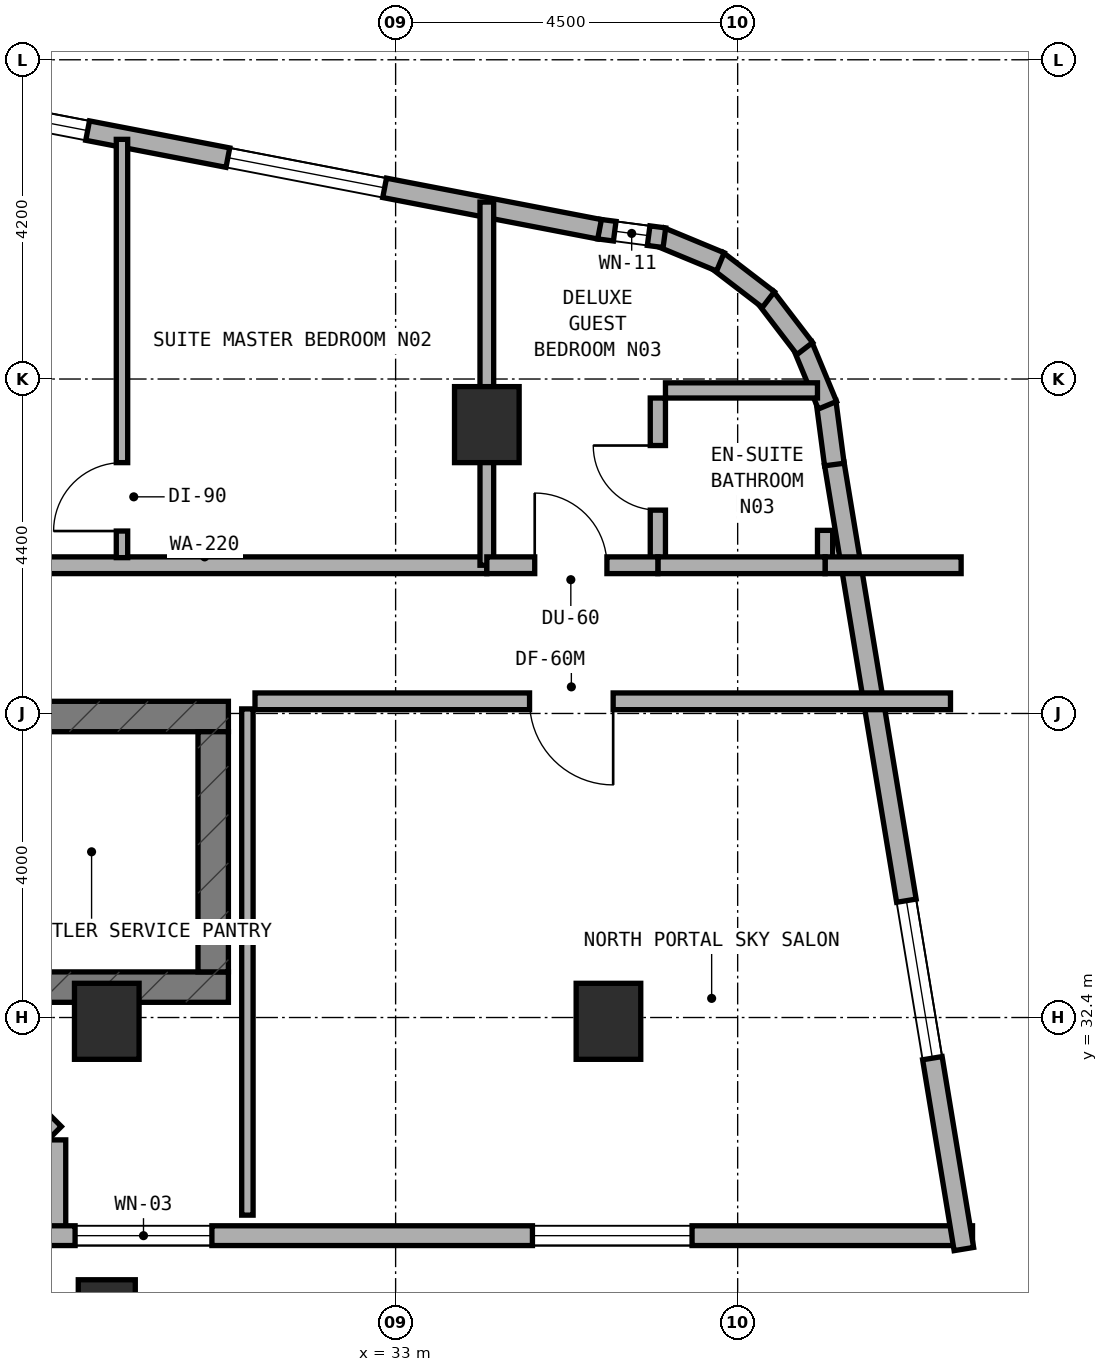
"""IFC4 building model, lengths in metres.
Left out: names, types, materials, properties, quantities, classifications, styles, units other than length and angle.
Written with IfcOpenShell. Run it as: python <this file> out.ifc"""

import sys

from ifc_helpers import new_model, si_unit, direction, frame, frame_2d, origin, origin_2d, place, context, subcontext, project, spatial, rectangle, extrude, element, fill, save


model = new_model("IFC4")
c1 = context("Model", 3, precision=1e-05, world=origin(), true_north=direction((0.0, 1.0)))
c2 = subcontext(c1, "Body", "Model", "MODEL_VIEW")
j1 = project(units=[si_unit("LENGTHUNIT", "METRE"), si_unit("PLANEANGLEUNIT", "RADIAN")], contexts=[c1])
p1 = place(None, origin())
s1 = spatial("IfcSite", under=j1, at=p1, CompositionType="ELEMENT")
p2 = place(p1, origin())
s2 = spatial("IfcBuilding", under=s1, at=p2, CompositionType="ELEMENT")
p3 = place(p2, frame((0.0, 0.0, 181.1)))
s3 = spatial("IfcBuildingStorey", under=s2, at=p3, CompositionType="ELEMENT", Elevation=181.1)
p4 = place(p3, frame((6.4, 32.8, 0.0), z_axis=(0.0, 0.0, 1.0), x_axis=(1.0, 0.0, 0.0)))
e1 = element("IfcWall", 1, at=p4, inside=s3, PredefinedType="SHEAR", context=c2, shape_type="SweptSolid", body=[
    extrude(rectangle(XDim=24.4, YDim=0.4, at=frame_2d((12.2, 0.0))), origin(), (0.0, 0.0, 1.0), 3.6),
])
p5 = place(p4, frame((6.05, 0.0, 0.0)))
e2 = element("IfcOpeningElement", 2, at=p5, cuts=e1, PredefinedType="OPENING", context=c2, shape_type="SweptSolid", body=[
    extrude(rectangle(XDim=1.1, YDim=2.15, at=frame_2d((0.55, 1.075))), frame((0.0, 0.21, 0.0), z_axis=(0.0, -1.0, 0.0), x_axis=(1.0, 0.0, 0.0)), (0.0, 0.0, 1.0), 0.42),
])
p6 = place(p3, frame((6.4, 36.36, 0.0), z_axis=(0.0, 0.0, 1.0), x_axis=(1.0, 0.0, 0.0)))
e3 = element("IfcWall", 3, at=p6, inside=s3, PredefinedType="SHEAR", context=c2, shape_type="SweptSolid", body=[
    extrude(rectangle(XDim=24.4, YDim=0.4, at=frame_2d((12.2, 0.0))), origin(), (0.0, 0.0, 1.0), 3.6),
])
p7 = place(p6, frame((9.15, 0.0, 0.0)))
e4 = element("IfcOpeningElement", 4, at=p7, cuts=e3, PredefinedType="OPENING", context=c2, shape_type="SweptSolid", body=[
    extrude(rectangle(XDim=1.2, YDim=2.15, at=frame_2d((0.6, 1.075))), frame((0.0, 0.21, 0.0), z_axis=(0.0, -1.0, 0.0), x_axis=(1.0, 0.0, 0.0)), (0.0, 0.0, 1.0), 0.42),
])
p8 = place(p6, frame((19.2, 0.0, 0.0)))
e5 = element("IfcOpeningElement", 5, at=p8, cuts=e3, PredefinedType="OPENING", context=c2, shape_type="SweptSolid", body=[
    extrude(rectangle(XDim=0.85, YDim=2.1, at=frame_2d((0.425, 1.05))), frame((0.0, 0.21, 0.0), z_axis=(0.0, -1.0, 0.0), x_axis=(1.0, 0.0, 0.0)), (0.0, 0.0, 1.0), 0.42),
])
p9 = place(p6, frame((17.22, 0.0, 0.0)))
e6 = element("IfcOpeningElement", 6, at=p9, cuts=e3, PredefinedType="OPENING", context=c2, shape_type="SweptSolid", body=[
    extrude(rectangle(XDim=0.85, YDim=2.1, at=frame_2d((0.425, 1.05))), frame((0.0, 0.21, 0.0), z_axis=(0.0, -1.0, 0.0), x_axis=(1.0, 0.0, 0.0)), (0.0, 0.0, 1.0), 0.42),
])
p10 = place(p3, frame((30.6, 33.0, 0.0), z_axis=(0.0, 0.0, 1.0), x_axis=(0.0, 1.0, 0.0)))
e7 = element("IfcWall", 7, at=p10, inside=s3, PredefinedType="SHEAR", context=c2, shape_type="SweptSolid", body=[
    extrude(rectangle(XDim=3.16, YDim=0.4, at=frame_2d((1.58, 0.0))), origin(), (0.0, 0.0, 1.0), 3.6),
])
for number, where, z_axis, x_axis in (
    (8, (34.2, 40.2, 0.0), (0.0, 0.0, 1.0), (1.0, 0.0, 0.0)),
    (9, (35.8, 32.35, 0.0), (0.0, 0.0, 1.0), (1.0, 0.0, 0.0)),
    (10, (29.2, 32.35, 0.0), (0.0, 0.0, 1.0), (1.0, 0.0, 0.0)),
):
    element("IfcColumn", number, at=place(p3, frame(where, z_axis=z_axis, x_axis=x_axis)), inside=s3, PredefinedType="COLUMN", context=c2, shape_type="SweptSolid", body=[
        extrude(rectangle(XDim=0.85, YDim=1.0, at=origin_2d()), origin(), (0.0, 0.0, 1.0), 3.6),
    ])
p11 = place(p3, frame((29.2, 28.5, 0.0), z_axis=(0.0, 0.0, 1.0), x_axis=(1.0, 0.0, 0.0)))
e11 = element("IfcColumn", 11, at=p11, inside=s3, PredefinedType="COLUMN", context=c2, shape_type="SweptSolid", body=[
    extrude(rectangle(XDim=0.75, YDim=0.9, at=origin_2d()), origin(), (0.0, 0.0, 1.0), 3.6),
])
p12 = place(p3, frame((26.722, 32.662, 0.0), z_axis=(0.0, 0.0, 1.0), x_axis=(0.707106781187, -0.707106781187, 0.0)))
e12 = element("IfcWall", 12, at=p12, inside=s3, PredefinedType="STANDARD", context=c2, shape_type="SweptSolid", body=[
    extrude(rectangle(XDim=2.529, YDim=0.26, at=frame_2d((1.264, 0.0))), origin(), (0.0, 0.0, 1.0), 3.32),
])
p13 = place(p12, frame((0.364, 0.0, 0.85)))
e13 = element("IfcOpeningElement", 13, at=p13, cuts=e12, PredefinedType="OPENING", context=c2, shape_type="SweptSolid", body=[
    extrude(rectangle(XDim=1.8, YDim=1.5, at=frame_2d((0.9, 0.75))), frame((0.0, 0.14, 0.0), z_axis=(0.0, -1.0, 0.0), x_axis=(1.0, 0.0, 0.0)), (0.0, 0.0, 1.0), 0.28),
])
p14 = place(p3, frame((28.53, 30.79, 0.0), z_axis=(0.0, 0.0, 1.0), x_axis=(0.0, -1.0, 0.0)))
e14 = element("IfcWall", 14, at=p14, inside=s3, PredefinedType="STANDARD", context=c2, shape_type="SweptSolid", body=[
    extrude(rectangle(XDim=1.38, YDim=0.26, at=frame_2d((0.69, 0.0))), origin(), (0.0, 0.0, 1.0), 3.32),
])
p15 = place(p3, frame((28.375, 29.53, 0.0), z_axis=(0.0, 0.0, 1.0), x_axis=(1.0, 0.0, 0.0)))
e15 = element("IfcWall", 15, at=p15, inside=s3, PredefinedType="STANDARD", context=c2, shape_type="SweptSolid", body=[
    extrude(rectangle(XDim=12.215, YDim=0.26, at=frame_2d((6.107, 0.0))), origin(), (0.0, 0.0, 1.0), 2.995),
])
p16 = place(p15, frame((0.408, 0.0, 0.85)))
e16 = element("IfcOpeningElement", 16, at=p16, cuts=e15, PredefinedType="OPENING", context=c2, shape_type="SweptSolid", body=[
    extrude(rectangle(XDim=1.8, YDim=1.5, at=frame_2d((0.9, 0.75))), frame((0.0, 0.14, 0.0), z_axis=(0.0, -1.0, 0.0), x_axis=(1.0, 0.0, 0.0)), (0.0, 0.0, 1.0), 0.28),
])
p17 = place(p15, frame((6.425, 0.0, 0.85)))
e17 = element("IfcOpeningElement", 17, at=p17, cuts=e15, PredefinedType="OPENING", context=c2, shape_type="SweptSolid", body=[
    extrude(rectangle(XDim=2.1, YDim=1.5, at=frame_2d((1.05, 0.75))), frame((0.0, 0.14, 0.0), z_axis=(0.0, -1.0, 0.0), x_axis=(1.0, 0.0, 0.0)), (0.0, 0.0, 1.0), 0.28),
])
p18 = place(p3, frame((40.476, 29.354, 0.0), z_axis=(0.0, 0.0, 1.0), x_axis=(-0.162811037825, 0.986657268742, 0.0)))
e18 = element("IfcWall", 18, at=p18, inside=s3, PredefinedType="STANDARD", context=c2, shape_type="SweptSolid", body=[
    extrude(rectangle(XDim=10.473, YDim=0.26, at=frame_2d((5.236, 0.0))), origin(), (0.0, 0.0, 1.0), 3.32),
])
p19 = place(p18, frame((2.545, 0.0, 0.85)))
e19 = element("IfcOpeningElement", 19, at=p19, cuts=e18, PredefinedType="OPENING", context=c2, shape_type="SweptSolid", body=[
    extrude(rectangle(XDim=2.1, YDim=1.5, at=frame_2d((1.05, 0.75))), frame((0.0, 0.14, 0.0), z_axis=(0.0, -1.0, 0.0), x_axis=(1.0, 0.0, 0.0)), (0.0, 0.0, 1.0), 0.28),
])
p20 = place(p3, frame((38.772, 39.675, 0.0), z_axis=(0.0, 0.0, 1.0), x_axis=(-0.130704676564, 0.99142134712, 0.0)))
e20 = element("IfcWall", 20, at=p20, inside=s3, PredefinedType="STANDARD", context=c2, shape_type="SweptSolid", body=[
    extrude(rectangle(XDim=0.833, YDim=0.26, at=frame_2d((0.417, 0.0))), origin(), (0.0, 0.0, 1.0), 3.32),
])
p21 = place(p3, frame((38.681, 40.455, 0.0), z_axis=(0.0, 0.0, 1.0), x_axis=(-0.383086687796, 0.923712395518, 0.0)))
e21 = element("IfcWall", 21, at=p21, inside=s3, PredefinedType="STANDARD", context=c2, shape_type="SweptSolid", body=[
    extrude(rectangle(XDim=0.851, YDim=0.26, at=frame_2d((0.425, 0.0))), origin(), (0.0, 0.0, 1.0), 3.32),
])
for number, where, z_axis, x_axis in (
    (22, (38.383, 41.201, 0.0), (0.0, 0.0, 1.0), (-0.608, 0.794, 0.0)),
    (23, (37.904, 41.845, 0.0), (0.0, 0.0, 1.0), (-0.794, 0.608, 0.0)),
):
    element("IfcWall", number, at=place(p3, frame(where, z_axis=z_axis, x_axis=x_axis)), inside=s3, PredefinedType="STANDARD", context=c2, shape_type="SweptSolid", body=[
        extrude(rectangle(XDim=0.85, YDim=0.26, at=frame_2d((0.425, 0.0))), origin(), (0.0, 0.0, 1.0), 3.32),
    ])
p22 = place(p3, frame((37.273, 42.341, 0.0), z_axis=(0.0, 0.0, 1.0), x_axis=(-0.923712395518, 0.383086687796, 0.0)))
e24 = element("IfcWall", 24, at=p22, inside=s3, PredefinedType="STANDARD", context=c2, shape_type="SweptSolid", body=[
    extrude(rectangle(XDim=0.851, YDim=0.26, at=frame_2d((0.425, 0.0))), origin(), (0.0, 0.0, 1.0), 3.32),
])
p23 = place(p3, frame((36.536, 42.659, 0.0), z_axis=(0.0, 0.0, 1.0), x_axis=(-0.991488716273, 0.130192647656, 0.0)))
e25 = element("IfcWall", 25, at=p23, inside=s3, PredefinedType="STANDARD", context=c2, shape_type="SweptSolid", body=[
    extrude(rectangle(XDim=0.868, YDim=0.26, at=frame_2d((0.434, 0.0))), origin(), (0.0, 0.0, 1.0), 3.32),
])
p24 = place(p23, frame((0.209, 0.0, 0.85)))
e26 = element("IfcOpeningElement", 26, at=p24, cuts=e25, PredefinedType="OPENING", context=c2, shape_type="SweptSolid", body=[
    extrude(rectangle(XDim=0.45, YDim=1.5, at=frame_2d((0.225, 0.75))), frame((0.0, 0.14, 0.0), z_axis=(0.0, -1.0, 0.0), x_axis=(1.0, 0.0, 0.0)), (0.0, 0.0, 1.0), 0.28),
])
p25 = place(p3, frame((35.683, 42.77, 0.0), z_axis=(0.0, 0.0, 1.0), x_axis=(-0.98192801022, 0.189254809039, 0.0)))
e27 = element("IfcWall", 27, at=p25, inside=s3, PredefinedType="STANDARD", context=c2, shape_type="SweptSolid", body=[
    extrude(rectangle(XDim=9.046, YDim=0.26, at=frame_2d((4.523, 0.0))), origin(), (0.0, 0.0, 1.0), 3.32),
])
p26 = place(p25, frame((2.88, 0.0, 0.85)))
e28 = element("IfcOpeningElement", 28, at=p26, cuts=e27, PredefinedType="OPENING", context=c2, shape_type="SweptSolid", body=[
    extrude(rectangle(XDim=2.1, YDim=1.5, at=frame_2d((1.05, 0.75))), frame((0.0, 0.14, 0.0), z_axis=(0.0, -1.0, 0.0), x_axis=(1.0, 0.0, 0.0)), (0.0, 0.0, 1.0), 0.28),
])
p27 = place(p25, frame((6.859, 0.0, 0.85)))
e29 = element("IfcOpeningElement", 29, at=p27, cuts=e27, PredefinedType="OPENING", context=c2, shape_type="SweptSolid", body=[
    extrude(rectangle(XDim=1.8, YDim=1.5, at=frame_2d((0.9, 0.75))), frame((0.0, 0.14, 0.0), z_axis=(0.0, -1.0, 0.0), x_axis=(1.0, 0.0, 0.0)), (0.0, 0.0, 1.0), 0.28),
])
p28 = place(p3, frame((18.4, 38.35, 0.0), z_axis=(0.0, 0.0, 1.0), x_axis=(1.0, 0.0, 0.0)))
e30 = element("IfcWall", 30, at=p28, inside=s3, PredefinedType="SOLIDWALL", context=c2, shape_type="SweptSolid", body=[
    extrude(rectangle(XDim=15.8, YDim=0.22, at=frame_2d((7.9, 0.0))), origin(), (0.0, 0.0, 1.0), 2.995),
])
p29 = place(p28, frame((7.425, 0.0, 0.0)))
e31 = element("IfcOpeningElement", 31, at=p29, cuts=e30, PredefinedType="OPENING", context=c2, shape_type="SweptSolid", body=[
    extrude(rectangle(XDim=0.95, YDim=2.1, at=frame_2d((0.475, 1.05))), frame((0.0, 0.12, 0.0), z_axis=(0.0, -1.0, 0.0), x_axis=(1.0, 0.0, 0.0)), (0.0, 0.0, 1.0), 0.24),
])
p30 = place(p3, frame((29.4, 38.45, 0.0), z_axis=(0.0, 0.0, 1.0), x_axis=(0.0, 1.0, 0.0)))
e32 = element("IfcWall", 32, at=p30, inside=s3, PredefinedType="PARTITIONING", context=c2, shape_type="SweptSolid", body=[
    extrude(rectangle(XDim=5.503, YDim=0.15, at=frame_2d((2.751, 0.0))), origin(), (0.0, 0.0, 1.0), 2.895),
])
p31 = place(p30, frame((0.35, 0.0, 0.0)))
e33 = element("IfcOpeningElement", 33, at=p31, cuts=e32, PredefinedType="OPENING", context=c2, shape_type="SweptSolid", body=[
    extrude(rectangle(XDim=0.9, YDim=2.1, at=frame_2d((0.45, 1.05))), frame((0.0, 0.085, 0.0), z_axis=(0.0, -1.0, 0.0), x_axis=(1.0, 0.0, 0.0)), (0.0, 0.0, 1.0), 0.17),
])
p32 = place(p3, frame((34.2, 38.35, 0.0), z_axis=(0.0, 0.0, 1.0), x_axis=(0.0, 1.0, 0.0)))
e34 = element("IfcWall", 34, at=p32, inside=s3, PredefinedType="SOLIDWALL", context=c2, shape_type="SweptSolid", body=[
    extrude(rectangle(XDim=4.778, YDim=0.18, at=frame_2d((2.389, 0.0))), origin(), (0.0, 0.0, 1.0), 2.935),
])
p33 = place(p3, frame((36.45, 38.45, 0.0), z_axis=(0.0, 0.0, 1.0), x_axis=(0.0, 1.0, 0.0)))
e35 = element("IfcWall", 35, at=p33, inside=s3, PredefinedType="PLUMBINGWALL", context=c2, shape_type="SweptSolid", body=[
    extrude(rectangle(XDim=2.1, YDim=0.2, at=frame_2d((1.05, 0.0))), origin(), (0.0, 0.0, 1.0), 3.32),
])
p34 = place(p33, frame((0.625, 0.0, 0.0)))
e36 = element("IfcOpeningElement", 36, at=p34, cuts=e35, PredefinedType="OPENING", context=c2, shape_type="SweptSolid", body=[
    extrude(rectangle(XDim=0.85, YDim=2.1, at=frame_2d((0.425, 1.05))), frame((0.0, 0.11, 0.0), z_axis=(0.0, -1.0, 0.0), x_axis=(1.0, 0.0, 0.0)), (0.0, 0.0, 1.0), 0.22),
])
p35 = place(p3, frame((36.55, 40.65, 0.0), z_axis=(0.0, 0.0, 1.0), x_axis=(1.0, 0.0, 0.0)))
e37 = element("IfcWall", 37, at=p35, inside=s3, PredefinedType="PLUMBINGWALL", context=c2, shape_type="SweptSolid", body=[
    extrude(rectangle(XDim=2.0, YDim=0.2, at=frame_2d((1.0, 0.0))), origin(), (0.0, 0.0, 1.0), 3.32),
])
p36 = place(p3, frame((38.65, 38.35, 0.0), z_axis=(0.0, 0.0, 1.0), x_axis=(0.0, 1.0, 0.0)))
e38 = element("IfcWall", 38, at=p36, inside=s3, PredefinedType="PLUMBINGWALL", context=c2, shape_type="SweptSolid", body=[
    extrude(rectangle(XDim=0.459, YDim=0.2, at=frame_2d((0.229, 0.0))), origin(), (0.0, 0.0, 1.0), 3.32),
])
p37 = place(p3, frame((38.65, 38.35, 0.0), z_axis=(0.0, 0.0, 1.0), x_axis=(1.0, 0.0, 0.0)))
e39 = element("IfcWall", 39, at=p37, inside=s3, PredefinedType="SOLIDWALL", context=c2, shape_type="SweptSolid", body=[
    extrude(rectangle(XDim=1.79, YDim=0.22, at=frame_2d((0.895, 0.0))), origin(), (0.0, 0.0, 1.0), 3.32),
])
p38 = place(p3, frame((36.45, 38.35, 0.0), z_axis=(0.0, 0.0, 1.0), x_axis=(1.0, 0.0, 0.0)))
e40 = element("IfcWall", 40, at=p38, inside=s3, PredefinedType="SOLIDWALL", context=c2, shape_type="SweptSolid", body=[
    extrude(rectangle(XDim=2.2, YDim=0.22, at=frame_2d((1.1, 0.0))), origin(), (0.0, 0.0, 1.0), 3.32),
])
p39 = place(p3, frame((34.2, 38.35, 0.0), z_axis=(0.0, 0.0, 1.0), x_axis=(1.0, 0.0, 0.0)))
e41 = element("IfcWall", 41, at=p39, inside=s3, PredefinedType="SOLIDWALL", context=c2, shape_type="SweptSolid", body=[
    extrude(rectangle(XDim=2.25, YDim=0.22, at=frame_2d((1.125, 0.0))), origin(), (0.0, 0.0, 1.0), 2.935),
])
p40 = place(p39, frame((0.63, 0.0, 0.0)))
e42 = element("IfcOpeningElement", 42, at=p40, cuts=e41, PredefinedType="OPENING", context=c2, shape_type="SweptSolid", body=[
    extrude(rectangle(XDim=0.95, YDim=2.1, at=frame_2d((0.475, 1.05))), frame((0.0, 0.12, 0.0), z_axis=(0.0, -1.0, 0.0), x_axis=(1.0, 0.0, 0.0)), (0.0, 0.0, 1.0), 0.24),
])
p41 = place(p3, frame((31.05, 29.8, 0.0), z_axis=(0.0, 0.0, 1.0), x_axis=(0.0, 1.0, 0.0)))
e43 = element("IfcWall", 43, at=p41, inside=s3, PredefinedType="PARTITIONING", context=c2, shape_type="SweptSolid", body=[
    extrude(rectangle(XDim=6.66, YDim=0.15, at=frame_2d((3.33, 0.0))), origin(), (0.0, 0.0, 1.0), 2.995),
])
p42 = place(p3, frame((31.15, 36.56, 0.0), z_axis=(0.0, 0.0, 1.0), x_axis=(1.0, 0.0, 0.0)))
e44 = element("IfcWall", 44, at=p42, inside=s3, PredefinedType="SOLIDWALL", context=c2, shape_type="SweptSolid", body=[
    extrude(rectangle(XDim=9.15, YDim=0.22, at=frame_2d((4.575, 0.0))), origin(), (0.0, 0.0, 1.0), 2.935),
])
p43 = place(p42, frame((3.612, 0.0, 0.0)))
e45 = element("IfcOpeningElement", 45, at=p43, cuts=e44, PredefinedType="OPENING", context=c2, shape_type="SweptSolid", body=[
    extrude(rectangle(XDim=1.1, YDim=2.1, at=frame_2d((0.55, 1.05))), frame((0.0, 0.12, 0.0), z_axis=(0.0, -1.0, 0.0), x_axis=(1.0, 0.0, 0.0)), (0.0, 0.0, 1.0), 0.24),
])
p44 = place(p16, origin())
e46 = element("IfcWindow", 46, at=p44, inside=s3, PartitioningType="SINGLE_PANEL", PredefinedType="WINDOW", context=c2, shape_type="SweptSolid", body=[
    extrude(rectangle(XDim=1.8, YDim=1.5, at=frame_2d((0.9, 0.75))), frame((0.0, 0.03, 0.0), z_axis=(0.0, -1.0, 0.0), x_axis=(1.0, 0.0, 0.0)), (0.0, 0.0, 1.0), 0.06),
])
fill(e16, e46)
p45 = place(p17, origin())
e47 = element("IfcWindow", 47, at=p45, inside=s3, PartitioningType="SINGLE_PANEL", PredefinedType="WINDOW", context=c2, shape_type="SweptSolid", body=[
    extrude(rectangle(XDim=2.1, YDim=1.5, at=frame_2d((1.05, 0.75))), frame((0.0, 0.03, 0.0), z_axis=(0.0, -1.0, 0.0), x_axis=(1.0, 0.0, 0.0)), (0.0, 0.0, 1.0), 0.06),
])
fill(e17, e47)
p46 = place(p19, origin())
e48 = element("IfcWindow", 48, at=p46, inside=s3, PartitioningType="SINGLE_PANEL", PredefinedType="WINDOW", context=c2, shape_type="SweptSolid", body=[
    extrude(rectangle(XDim=2.1, YDim=1.5, at=frame_2d((1.05, 0.75))), frame((0.0, 0.03, 0.0), z_axis=(0.0, -1.0, 0.0), x_axis=(1.0, 0.0, 0.0)), (0.0, 0.0, 1.0), 0.06),
])
fill(e19, e48)
p47 = place(p26, origin())
e49 = element("IfcWindow", 49, at=p47, inside=s3, PartitioningType="SINGLE_PANEL", PredefinedType="WINDOW", context=c2, shape_type="SweptSolid", body=[
    extrude(rectangle(XDim=2.1, YDim=1.5, at=frame_2d((1.05, 0.75))), frame((0.0, 0.03, 0.0), z_axis=(0.0, -1.0, 0.0), x_axis=(1.0, 0.0, 0.0)), (0.0, 0.0, 1.0), 0.06),
])
fill(e28, e49)
p48 = place(p27, origin())
e50 = element("IfcWindow", 50, at=p48, inside=s3, PartitioningType="SINGLE_PANEL", PredefinedType="WINDOW", context=c2, shape_type="SweptSolid", body=[
    extrude(rectangle(XDim=1.8, YDim=1.5, at=frame_2d((0.9, 0.75))), frame((0.0, 0.03, 0.0), z_axis=(0.0, -1.0, 0.0), x_axis=(1.0, 0.0, 0.0)), (0.0, 0.0, 1.0), 0.06),
])
fill(e29, e50)
p49 = place(p24, origin())
e51 = element("IfcWindow", 51, at=p49, inside=s3, PartitioningType="SINGLE_PANEL", PredefinedType="WINDOW", context=c2, shape_type="SweptSolid", body=[
    extrude(rectangle(XDim=0.45, YDim=1.5, at=frame_2d((0.225, 0.75))), frame((0.0, 0.03, 0.0), z_axis=(0.0, -1.0, 0.0), x_axis=(1.0, 0.0, 0.0)), (0.0, 0.0, 1.0), 0.06),
])
fill(e26, e51)
p50 = place(p31, origin())
e52 = element("IfcDoor", 52, at=p50, inside=s3, OperationType="SINGLE_SWING_LEFT", PredefinedType="DOOR", context=c2, shape_type="SweptSolid", body=[
    extrude(rectangle(XDim=0.9, YDim=2.1, at=frame_2d((0.45, 1.05))), frame((0.0, 0.025, 0.0), z_axis=(0.0, -1.0, 0.0), x_axis=(1.0, 0.0, 0.0)), (0.0, 0.0, 1.0), 0.05),
])
fill(e33, e52)
p51 = place(p34, origin())
e53 = element("IfcDoor", 53, at=p51, inside=s3, OperationType="SINGLE_SWING_RIGHT", PredefinedType="DOOR", context=c2, shape_type="SweptSolid", body=[
    extrude(rectangle(XDim=0.85, YDim=2.1, at=frame_2d((0.425, 1.05))), frame((0.0, 0.025, 0.0), z_axis=(0.0, -1.0, 0.0), x_axis=(1.0, 0.0, 0.0)), (0.0, 0.0, 1.0), 0.05),
])
fill(e36, e53)
p52 = place(p40, origin())
e54 = element("IfcDoor", 54, at=p52, inside=s3, OperationType="SINGLE_SWING_LEFT", PredefinedType="DOOR", context=c2, shape_type="SweptSolid", body=[
    extrude(rectangle(XDim=0.95, YDim=2.1, at=frame_2d((0.475, 1.05))), frame((0.0, 0.025, 0.0), z_axis=(0.0, -1.0, 0.0), x_axis=(1.0, 0.0, 0.0)), (0.0, 0.0, 1.0), 0.05),
])
fill(e42, e54)
p53 = place(p43, frame((1.1, 0.0, 0.0), z_axis=(0.0, 0.0, 1.0), x_axis=(-1.0, 0.0, 0.0)))
e55 = element("IfcDoor", 55, at=p53, inside=s3, OperationType="SINGLE_SWING_LEFT", PredefinedType="DOOR", context=c2, shape_type="SweptSolid", body=[
    extrude(rectangle(XDim=1.1, YDim=2.1, at=frame_2d((0.55, 1.05))), frame((0.0, 0.025, 0.0), z_axis=(0.0, -1.0, 0.0), x_axis=(1.0, 0.0, 0.0)), (0.0, 0.0, 1.0), 0.05),
])
fill(e45, e55)
save(model, sys.argv[1])
